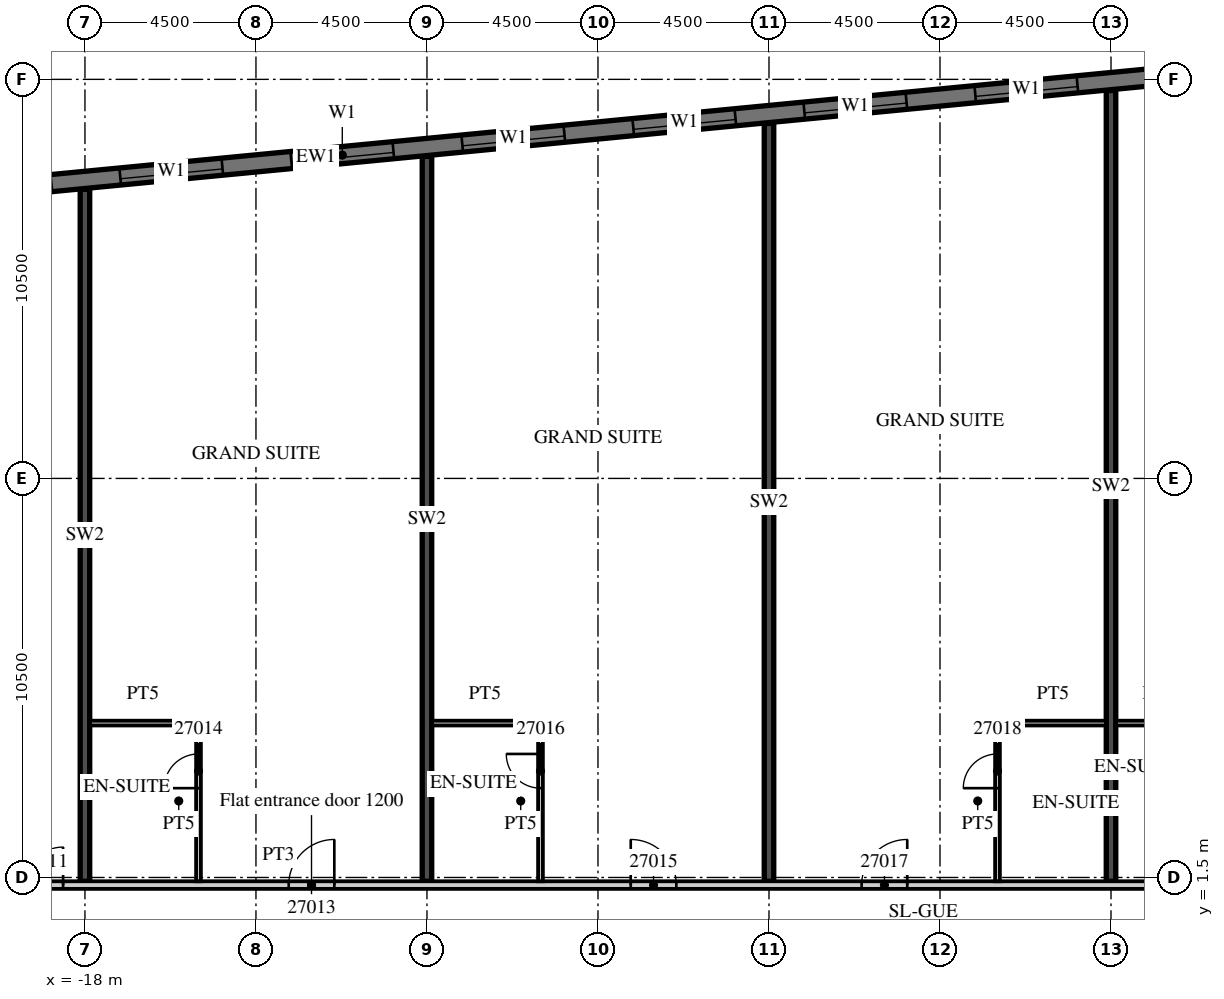
"""IFC4 building model, lengths in metres.
Left out: names, types, materials, properties, quantities, classifications, styles, units other than length and angle.
Written with IfcOpenShell. Run it as: python <this file> out.ifc"""

import sys

from ifc_helpers import new_model, si_unit, direction, frame, frame_2d, origin, place, context, subcontext, project, spatial, rectangle, extrude, element, fill, save


model = new_model("IFC4")
c1 = context("Model", 3, precision=1e-05, world=origin(), true_north=direction((0.0, 1.0)))
c2 = subcontext(c1, "Body", "Model", "MODEL_VIEW")
j1 = project(units=[si_unit("LENGTHUNIT", "METRE"), si_unit("PLANEANGLEUNIT", "RADIAN")], contexts=[c1])
p1 = place(None, origin())
s1 = spatial("IfcSite", under=j1, at=p1, CompositionType="ELEMENT")
p2 = place(p1, origin())
s2 = spatial("IfcBuilding", under=s1, at=p2, CompositionType="ELEMENT")
p3 = place(p2, frame((0.0, 0.0, 124.0)))
s3 = spatial("IfcBuildingStorey", under=s2, at=p3, CompositionType="ELEMENT", Elevation=124.0)
p4 = place(p3, frame((-18.0, 1.4, 0.0), z_axis=(0.0, 0.0, 1.0), x_axis=(0.0, 1.0, 0.0)))
e1 = element("IfcWall", 1, at=p4, inside=s3, PredefinedType="SHEAR", context=c2, shape_type="SweptSolid", body=[
    extrude(rectangle(XDim=18.207, YDim=0.25, at=frame_2d((9.104, 0.0))), origin(), (0.0, 0.0, 1.0), 3.3),
])
p5 = place(p3, frame((-9.0, 1.4, 0.0), z_axis=(0.0, 0.0, 1.0), x_axis=(0.0, 1.0, 0.0)))
e2 = element("IfcWall", 2, at=p5, inside=s3, PredefinedType="SHEAR", context=c2, shape_type="SweptSolid", body=[
    extrude(rectangle(XDim=19.073, YDim=0.25, at=frame_2d((9.537, 0.0))), origin(), (0.0, 0.0, 1.0), 3.3),
])
p6 = place(p3, frame((0.0, 1.4, 0.0), z_axis=(0.0, 0.0, 1.0), x_axis=(0.0, 1.0, 0.0)))
e3 = element("IfcWall", 3, at=p6, inside=s3, PredefinedType="SHEAR", context=c2, shape_type="SweptSolid", body=[
    extrude(rectangle(XDim=19.94, YDim=0.25, at=frame_2d((9.97, 0.0))), origin(), (0.0, 0.0, 1.0), 3.3),
])
p7 = place(p3, frame((9.0, 1.4, 0.0), z_axis=(0.0, 0.0, 1.0), x_axis=(0.0, 1.0, 0.0)))
e4 = element("IfcWall", 4, at=p7, inside=s3, PredefinedType="SHEAR", context=c2, shape_type="SweptSolid", body=[
    extrude(rectangle(XDim=20.807, YDim=0.25, at=frame_2d((10.403, 0.0))), origin(), (0.0, 0.0, 1.0), 3.3),
])
p8 = place(p3, frame((13.521, 22.89, 0.0), z_axis=(0.0, 0.0, 1.0), x_axis=(-0.995396445054, -0.095843190545, 0.0)))
e5 = element("IfcWall", 5, at=p8, inside=s3, PredefinedType="SOLIDWALL", context=c2, shape_type="SweptSolid", body=[
    extrude(rectangle(XDim=51.114, YDim=0.45, at=frame_2d((25.557, 0.0))), origin(), (0.0, 0.0, 1.0), 3.02),
])
p9 = place(p8, frame((0.91, 0.0, 0.45)))
e6 = element("IfcOpeningElement", 6, at=p9, cuts=e5, PredefinedType="OPENING", context=c2, shape_type="SweptSolid", body=[
    extrude(rectangle(XDim=2.7, YDim=2.25, at=frame_2d((1.35, 1.125))), frame((0.0, 0.235, 0.0), z_axis=(0.0, -1.0, 0.0), x_axis=(1.0, 0.0, 0.0)), (0.0, 0.0, 1.0), 0.47),
])
p10 = place(p8, frame((5.431, 0.0, 0.45)))
e7 = element("IfcOpeningElement", 7, at=p10, cuts=e5, PredefinedType="OPENING", context=c2, shape_type="SweptSolid", body=[
    extrude(rectangle(XDim=2.7, YDim=2.25, at=frame_2d((1.35, 1.125))), frame((0.0, 0.235, 0.0), z_axis=(0.0, -1.0, 0.0), x_axis=(1.0, 0.0, 0.0)), (0.0, 0.0, 1.0), 0.47),
])
p11 = place(p8, frame((9.952, 0.0, 0.45)))
e8 = element("IfcOpeningElement", 8, at=p11, cuts=e5, PredefinedType="OPENING", context=c2, shape_type="SweptSolid", body=[
    extrude(rectangle(XDim=2.7, YDim=2.25, at=frame_2d((1.35, 1.125))), frame((0.0, 0.235, 0.0), z_axis=(0.0, -1.0, 0.0), x_axis=(1.0, 0.0, 0.0)), (0.0, 0.0, 1.0), 0.47),
])
p12 = place(p8, frame((14.473, 0.0, 0.45)))
e9 = element("IfcOpeningElement", 9, at=p12, cuts=e5, PredefinedType="OPENING", context=c2, shape_type="SweptSolid", body=[
    extrude(rectangle(XDim=2.7, YDim=2.25, at=frame_2d((1.35, 1.125))), frame((0.0, 0.235, 0.0), z_axis=(0.0, -1.0, 0.0), x_axis=(1.0, 0.0, 0.0)), (0.0, 0.0, 1.0), 0.47),
])
p13 = place(p8, frame((18.994, 0.0, 0.45)))
e10 = element("IfcOpeningElement", 10, at=p13, cuts=e5, PredefinedType="OPENING", context=c2, shape_type="SweptSolid", body=[
    extrude(rectangle(XDim=2.7, YDim=2.25, at=frame_2d((1.35, 1.125))), frame((0.0, 0.235, 0.0), z_axis=(0.0, -1.0, 0.0), x_axis=(1.0, 0.0, 0.0)), (0.0, 0.0, 1.0), 0.47),
])
p14 = place(p8, frame((23.514, 0.0, 0.45)))
e11 = element("IfcOpeningElement", 11, at=p14, cuts=e5, PredefinedType="OPENING", context=c2, shape_type="SweptSolid", body=[
    extrude(rectangle(XDim=2.7, YDim=2.25, at=frame_2d((1.35, 1.125))), frame((0.0, 0.235, 0.0), z_axis=(0.0, -1.0, 0.0), x_axis=(1.0, 0.0, 0.0)), (0.0, 0.0, 1.0), 0.47),
])
p15 = place(p8, frame((28.035, 0.0, 0.45)))
e12 = element("IfcOpeningElement", 12, at=p15, cuts=e5, PredefinedType="OPENING", context=c2, shape_type="SweptSolid", body=[
    extrude(rectangle(XDim=2.7, YDim=2.25, at=frame_2d((1.35, 1.125))), frame((0.0, 0.235, 0.0), z_axis=(0.0, -1.0, 0.0), x_axis=(1.0, 0.0, 0.0)), (0.0, 0.0, 1.0), 0.47),
])
p16 = place(p8, frame((32.556, 0.0, 0.45)))
e13 = element("IfcOpeningElement", 13, at=p16, cuts=e5, PredefinedType="OPENING", context=c2, shape_type="SweptSolid", body=[
    extrude(rectangle(XDim=2.7, YDim=2.25, at=frame_2d((1.35, 1.125))), frame((0.0, 0.235, 0.0), z_axis=(0.0, -1.0, 0.0), x_axis=(1.0, 0.0, 0.0)), (0.0, 0.0, 1.0), 0.47),
])
p17 = place(p8, frame((37.077, 0.0, 0.45)))
e14 = element("IfcOpeningElement", 14, at=p17, cuts=e5, PredefinedType="OPENING", context=c2, shape_type="SweptSolid", body=[
    extrude(rectangle(XDim=2.7, YDim=2.25, at=frame_2d((1.35, 1.125))), frame((0.0, 0.235, 0.0), z_axis=(0.0, -1.0, 0.0), x_axis=(1.0, 0.0, 0.0)), (0.0, 0.0, 1.0), 0.47),
])
p18 = place(p8, frame((41.598, 0.0, 0.45)))
e15 = element("IfcOpeningElement", 15, at=p18, cuts=e5, PredefinedType="OPENING", context=c2, shape_type="SweptSolid", body=[
    extrude(rectangle(XDim=2.7, YDim=2.25, at=frame_2d((1.35, 1.125))), frame((0.0, 0.235, 0.0), z_axis=(0.0, -1.0, 0.0), x_axis=(1.0, 0.0, 0.0)), (0.0, 0.0, 1.0), 0.47),
])
p19 = place(p8, frame((46.118, 0.0, 0.45)))
e16 = element("IfcOpeningElement", 16, at=p19, cuts=e5, PredefinedType="OPENING", context=c2, shape_type="SweptSolid", body=[
    extrude(rectangle(XDim=2.7, YDim=2.25, at=frame_2d((1.35, 1.125))), frame((0.0, 0.235, 0.0), z_axis=(0.0, -1.0, 0.0), x_axis=(1.0, 0.0, 0.0)), (0.0, 0.0, 1.0), 0.47),
])
p20 = place(p3, frame((-39.316, 1.3, 0.0), z_axis=(0.0, 0.0, 1.0), x_axis=(1.0, 0.0, 0.0)))
e17 = element("IfcWall", 17, at=p20, inside=s3, PredefinedType="PARTITIONING", context=c2, shape_type="SweptSolid", body=[
    extrude(rectangle(XDim=52.816, YDim=0.2, at=frame_2d((26.408, 0.0))), origin(), (0.0, 0.0, 1.0), 3.02),
])
p21 = place(p20, frame((0.15, 0.0, 0.0)))
e18 = element("IfcOpeningElement", 18, at=p21, cuts=e17, PredefinedType="OPENING", context=c2, shape_type="SweptSolid", body=[
    extrude(rectangle(XDim=0.9, YDim=2.1, at=frame_2d((0.45, 1.05))), frame((0.0, 0.11, 0.0), z_axis=(0.0, -1.0, 0.0), x_axis=(1.0, 0.0, 0.0)), (0.0, 0.0, 1.0), 0.22),
])
p22 = place(p20, frame((3.891, 0.0, 0.0)))
e19 = element("IfcOpeningElement", 19, at=p22, cuts=e17, PredefinedType="OPENING", context=c2, shape_type="SweptSolid", body=[
    extrude(rectangle(XDim=1.0, YDim=2.1, at=frame_2d((0.5, 1.05))), frame((0.0, 0.11, 0.0), z_axis=(0.0, -1.0, 0.0), x_axis=(1.0, 0.0, 0.0)), (0.0, 0.0, 1.0), 0.22),
])
p23 = place(p20, frame((10.741, 0.0, 0.0)))
e20 = element("IfcOpeningElement", 20, at=p23, cuts=e17, PredefinedType="OPENING", context=c2, shape_type="SweptSolid", body=[
    extrude(rectangle(XDim=1.0, YDim=2.1, at=frame_2d((0.5, 1.05))), frame((0.0, 0.11, 0.0), z_axis=(0.0, -1.0, 0.0), x_axis=(1.0, 0.0, 0.0)), (0.0, 0.0, 1.0), 0.22),
])
p24 = place(p20, frame((15.266, 0.0, 0.0)))
e21 = element("IfcOpeningElement", 21, at=p24, cuts=e17, PredefinedType="OPENING", context=c2, shape_type="SweptSolid", body=[
    extrude(rectangle(XDim=1.0, YDim=2.1, at=frame_2d((0.5, 1.05))), frame((0.0, 0.11, 0.0), z_axis=(0.0, -1.0, 0.0), x_axis=(1.0, 0.0, 0.0)), (0.0, 0.0, 1.0), 0.22),
])
p25 = place(p20, frame((19.741, 0.0, 0.0)))
e22 = element("IfcOpeningElement", 22, at=p25, cuts=e17, PredefinedType="OPENING", context=c2, shape_type="SweptSolid", body=[
    extrude(rectangle(XDim=1.0, YDim=2.1, at=frame_2d((0.5, 1.05))), frame((0.0, 0.11, 0.0), z_axis=(0.0, -1.0, 0.0), x_axis=(1.0, 0.0, 0.0)), (0.0, 0.0, 1.0), 0.22),
])
p26 = place(p20, frame((26.678, 0.0, 0.0)))
e23 = element("IfcOpeningElement", 23, at=p26, cuts=e17, PredefinedType="OPENING", context=c2, shape_type="SweptSolid", body=[
    extrude(rectangle(XDim=1.2, YDim=2.1, at=frame_2d((0.6, 1.05))), frame((0.0, 0.11, 0.0), z_axis=(0.0, -1.0, 0.0), x_axis=(1.0, 0.0, 0.0)), (0.0, 0.0, 1.0), 0.22),
])
p27 = place(p20, frame((35.678, 0.0, 0.0)))
e24 = element("IfcOpeningElement", 24, at=p27, cuts=e17, PredefinedType="OPENING", context=c2, shape_type="SweptSolid", body=[
    extrude(rectangle(XDim=1.2, YDim=2.1, at=frame_2d((0.6, 1.05))), frame((0.0, 0.11, 0.0), z_axis=(0.0, -1.0, 0.0), x_axis=(1.0, 0.0, 0.0)), (0.0, 0.0, 1.0), 0.22),
])
p28 = place(p20, frame((41.754, 0.0, 0.0)))
e25 = element("IfcOpeningElement", 25, at=p28, cuts=e17, PredefinedType="OPENING", context=c2, shape_type="SweptSolid", body=[
    extrude(rectangle(XDim=1.2, YDim=2.1, at=frame_2d((0.6, 1.05))), frame((0.0, 0.11, 0.0), z_axis=(0.0, -1.0, 0.0), x_axis=(1.0, 0.0, 0.0)), (0.0, 0.0, 1.0), 0.22),
])
p29 = place(p20, frame((51.241, 0.0, 0.0)))
e26 = element("IfcOpeningElement", 26, at=p29, cuts=e17, PredefinedType="OPENING", context=c2, shape_type="SweptSolid", body=[
    extrude(rectangle(XDim=1.0, YDim=2.1, at=frame_2d((0.5, 1.05))), frame((0.0, 0.11, 0.0), z_axis=(0.0, -1.0, 0.0), x_axis=(1.0, 0.0, 0.0)), (0.0, 0.0, 1.0), 0.22),
])
p30 = place(p3, frame((-15.012, 1.4, 0.0), z_axis=(0.0, 0.0, 1.0), x_axis=(0.0, 1.0, 0.0)))
e27 = element("IfcWall", 27, at=p30, inside=s3, PredefinedType="PARTITIONING", context=c2, shape_type="SweptSolid", body=[
    extrude(rectangle(XDim=4.225, YDim=0.125, at=frame_2d((2.113, 0.0))), origin(), (0.0, 0.0, 1.0), 3.02),
])
p31 = place(p30, frame((2.45, 0.0, 0.0)))
e28 = element("IfcOpeningElement", 28, at=p31, cuts=e27, PredefinedType="OPENING", context=c2, shape_type="SweptSolid", body=[
    extrude(rectangle(XDim=0.9, YDim=2.1, at=frame_2d((0.45, 1.05))), frame((0.0, 0.073, 0.0), z_axis=(0.0, -1.0, 0.0), x_axis=(1.0, 0.0, 0.0)), (0.0, 0.0, 1.0), 0.145),
])
p32 = place(p3, frame((-17.875, 5.562, 0.0), z_axis=(0.0, 0.0, 1.0), x_axis=(1.0, 0.0, 0.0)))
e29 = element("IfcWall", 29, at=p32, inside=s3, PredefinedType="PARTITIONING", context=c2, shape_type="SweptSolid", body=[
    extrude(rectangle(XDim=2.8, YDim=0.125, at=frame_2d((1.4, 0.0))), origin(), (0.0, 0.0, 1.0), 3.02),
])
p33 = place(p3, frame((-6.013, 1.4, 0.0), z_axis=(0.0, 0.0, 1.0), x_axis=(0.0, 1.0, 0.0)))
e30 = element("IfcWall", 30, at=p33, inside=s3, PredefinedType="PARTITIONING", context=c2, shape_type="SweptSolid", body=[
    extrude(rectangle(XDim=4.225, YDim=0.125, at=frame_2d((2.113, 0.0))), origin(), (0.0, 0.0, 1.0), 3.02),
])
p34 = place(p33, frame((2.45, 0.0, 0.0)))
e31 = element("IfcOpeningElement", 31, at=p34, cuts=e30, PredefinedType="OPENING", context=c2, shape_type="SweptSolid", body=[
    extrude(rectangle(XDim=0.9, YDim=2.1, at=frame_2d((0.45, 1.05))), frame((0.0, 0.073, 0.0), z_axis=(0.0, -1.0, 0.0), x_axis=(1.0, 0.0, 0.0)), (0.0, 0.0, 1.0), 0.145),
])
p35 = place(p3, frame((-8.875, 5.562, 0.0), z_axis=(0.0, 0.0, 1.0), x_axis=(1.0, 0.0, 0.0)))
e32 = element("IfcWall", 32, at=p35, inside=s3, PredefinedType="PARTITIONING", context=c2, shape_type="SweptSolid", body=[
    extrude(rectangle(XDim=2.8, YDim=0.125, at=frame_2d((1.4, 0.0))), origin(), (0.0, 0.0, 1.0), 3.02),
])
p36 = place(p3, frame((6.013, 1.4, 0.0), z_axis=(0.0, 0.0, 1.0), x_axis=(0.0, 1.0, 0.0)))
e33 = element("IfcWall", 33, at=p36, inside=s3, PredefinedType="PARTITIONING", context=c2, shape_type="SweptSolid", body=[
    extrude(rectangle(XDim=4.225, YDim=0.125, at=frame_2d((2.113, 0.0))), origin(), (0.0, 0.0, 1.0), 3.02),
])
p37 = place(p36, frame((2.45, 0.0, 0.0)))
e34 = element("IfcOpeningElement", 34, at=p37, cuts=e33, PredefinedType="OPENING", context=c2, shape_type="SweptSolid", body=[
    extrude(rectangle(XDim=0.9, YDim=2.1, at=frame_2d((0.45, 1.05))), frame((0.0, 0.073, 0.0), z_axis=(0.0, -1.0, 0.0), x_axis=(1.0, 0.0, 0.0)), (0.0, 0.0, 1.0), 0.145),
])
p38 = place(p3, frame((6.075, 5.562, 0.0), z_axis=(0.0, 0.0, 1.0), x_axis=(1.0, 0.0, 0.0)))
e35 = element("IfcWall", 35, at=p38, inside=s3, PredefinedType="PARTITIONING", context=c2, shape_type="SweptSolid", body=[
    extrude(rectangle(XDim=2.8, YDim=0.125, at=frame_2d((1.4, 0.0))), origin(), (0.0, 0.0, 1.0), 3.02),
])
p39 = place(p3, frame((9.125, 5.562, 0.0), z_axis=(0.0, 0.0, 1.0), x_axis=(1.0, 0.0, 0.0)))
e36 = element("IfcWall", 36, at=p39, inside=s3, PredefinedType="PARTITIONING", context=c2, shape_type="SweptSolid", body=[
    extrude(rectangle(XDim=2.25, YDim=0.125, at=frame_2d((1.125, 0.0))), origin(), (0.0, 0.0, 1.0), 3.02),
])
p40 = place(p10, origin())
e37 = element("IfcWindow", 37, at=p40, inside=s3, PartitioningType="SINGLE_PANEL", PredefinedType="WINDOW", context=c2, shape_type="SweptSolid", body=[
    extrude(rectangle(XDim=2.7, YDim=2.25, at=frame_2d((1.35, 1.125))), frame((0.0, 0.09, 0.0), z_axis=(0.0, -1.0, 0.0), x_axis=(1.0, 0.0, 0.0)), (0.0, 0.0, 1.0), 0.06),
])
fill(e7, e37)
p41 = place(p11, origin())
e38 = element("IfcWindow", 38, at=p41, inside=s3, PartitioningType="SINGLE_PANEL", PredefinedType="WINDOW", context=c2, shape_type="SweptSolid", body=[
    extrude(rectangle(XDim=2.7, YDim=2.25, at=frame_2d((1.35, 1.125))), frame((0.0, 0.09, 0.0), z_axis=(0.0, -1.0, 0.0), x_axis=(1.0, 0.0, 0.0)), (0.0, 0.0, 1.0), 0.06),
])
fill(e8, e38)
p42 = place(p12, origin())
e39 = element("IfcWindow", 39, at=p42, inside=s3, PartitioningType="SINGLE_PANEL", PredefinedType="WINDOW", context=c2, shape_type="SweptSolid", body=[
    extrude(rectangle(XDim=2.7, YDim=2.25, at=frame_2d((1.35, 1.125))), frame((0.0, 0.09, 0.0), z_axis=(0.0, -1.0, 0.0), x_axis=(1.0, 0.0, 0.0)), (0.0, 0.0, 1.0), 0.06),
])
fill(e9, e39)
p43 = place(p13, origin())
e40 = element("IfcWindow", 40, at=p43, inside=s3, PartitioningType="SINGLE_PANEL", PredefinedType="WINDOW", context=c2, shape_type="SweptSolid", body=[
    extrude(rectangle(XDim=2.7, YDim=2.25, at=frame_2d((1.35, 1.125))), frame((0.0, 0.09, 0.0), z_axis=(0.0, -1.0, 0.0), x_axis=(1.0, 0.0, 0.0)), (0.0, 0.0, 1.0), 0.06),
])
fill(e10, e40)
p44 = place(p14, origin())
e41 = element("IfcWindow", 41, at=p44, inside=s3, PartitioningType="SINGLE_PANEL", PredefinedType="WINDOW", context=c2, shape_type="SweptSolid", body=[
    extrude(rectangle(XDim=2.7, YDim=2.25, at=frame_2d((1.35, 1.125))), frame((0.0, 0.09, 0.0), z_axis=(0.0, -1.0, 0.0), x_axis=(1.0, 0.0, 0.0)), (0.0, 0.0, 1.0), 0.06),
])
fill(e11, e41)
p45 = place(p15, origin())
e42 = element("IfcWindow", 42, at=p45, inside=s3, PartitioningType="SINGLE_PANEL", PredefinedType="WINDOW", context=c2, shape_type="SweptSolid", body=[
    extrude(rectangle(XDim=2.7, YDim=2.25, at=frame_2d((1.35, 1.125))), frame((0.0, 0.09, 0.0), z_axis=(0.0, -1.0, 0.0), x_axis=(1.0, 0.0, 0.0)), (0.0, 0.0, 1.0), 0.06),
])
fill(e12, e42)
p46 = place(p25, origin())
e43 = element("IfcDoor", 43, at=p46, inside=s3, OperationType="SINGLE_SWING_RIGHT", PredefinedType="DOOR", context=c2, shape_type="SweptSolid", body=[
    extrude(rectangle(XDim=1.0, YDim=2.1, at=frame_2d((0.5, 1.05))), frame((0.0, 0.025, 0.0), z_axis=(0.0, -1.0, 0.0), x_axis=(1.0, 0.0, 0.0)), (0.0, 0.0, 1.0), 0.05),
])
fill(e22, e43)
p47 = place(p26, origin())
e44 = element("IfcDoor", 44, at=p47, inside=s3, OperationType="SINGLE_SWING_RIGHT", PredefinedType="DOOR", context=c2, shape_type="SweptSolid", body=[
    extrude(rectangle(XDim=1.2, YDim=2.1, at=frame_2d((0.6, 1.05))), frame((0.0, 0.025, 0.0), z_axis=(0.0, -1.0, 0.0), x_axis=(1.0, 0.0, 0.0)), (0.0, 0.0, 1.0), 0.05),
])
fill(e23, e44)
p48 = place(p31, origin())
e45 = element("IfcDoor", 45, at=p48, inside=s3, OperationType="SINGLE_SWING_LEFT", PredefinedType="DOOR", context=c2, shape_type="SweptSolid", body=[
    extrude(rectangle(XDim=0.9, YDim=2.1, at=frame_2d((0.45, 1.05))), frame((0.0, 0.025, 0.0), z_axis=(0.0, -1.0, 0.0), x_axis=(1.0, 0.0, 0.0)), (0.0, 0.0, 1.0), 0.05),
])
fill(e28, e45)
p49 = place(p27, origin())
e46 = element("IfcDoor", 46, at=p49, inside=s3, OperationType="SINGLE_SWING_LEFT", PredefinedType="DOOR", context=c2, shape_type="SweptSolid", body=[
    extrude(rectangle(XDim=1.2, YDim=2.1, at=frame_2d((0.6, 1.05))), frame((0.0, 0.025, 0.0), z_axis=(0.0, -1.0, 0.0), x_axis=(1.0, 0.0, 0.0)), (0.0, 0.0, 1.0), 0.05),
])
fill(e24, e46)
p50 = place(p34, origin())
e47 = element("IfcDoor", 47, at=p50, inside=s3, OperationType="SINGLE_SWING_RIGHT", PredefinedType="DOOR", context=c2, shape_type="SweptSolid", body=[
    extrude(rectangle(XDim=0.9, YDim=2.1, at=frame_2d((0.45, 1.05))), frame((0.0, 0.025, 0.0), z_axis=(0.0, -1.0, 0.0), x_axis=(1.0, 0.0, 0.0)), (0.0, 0.0, 1.0), 0.05),
])
fill(e31, e47)
p51 = place(p28, origin())
e48 = element("IfcDoor", 48, at=p51, inside=s3, OperationType="SINGLE_SWING_RIGHT", PredefinedType="DOOR", context=c2, shape_type="SweptSolid", body=[
    extrude(rectangle(XDim=1.2, YDim=2.1, at=frame_2d((0.6, 1.05))), frame((0.0, 0.025, 0.0), z_axis=(0.0, -1.0, 0.0), x_axis=(1.0, 0.0, 0.0)), (0.0, 0.0, 1.0), 0.05),
])
fill(e25, e48)
p52 = place(p37, origin())
e49 = element("IfcDoor", 49, at=p52, inside=s3, OperationType="SINGLE_SWING_LEFT", PredefinedType="DOOR", context=c2, shape_type="SweptSolid", body=[
    extrude(rectangle(XDim=0.9, YDim=2.1, at=frame_2d((0.45, 1.05))), frame((0.0, 0.025, 0.0), z_axis=(0.0, -1.0, 0.0), x_axis=(1.0, 0.0, 0.0)), (0.0, 0.0, 1.0), 0.05),
])
fill(e34, e49)
save(model, sys.argv[1])
